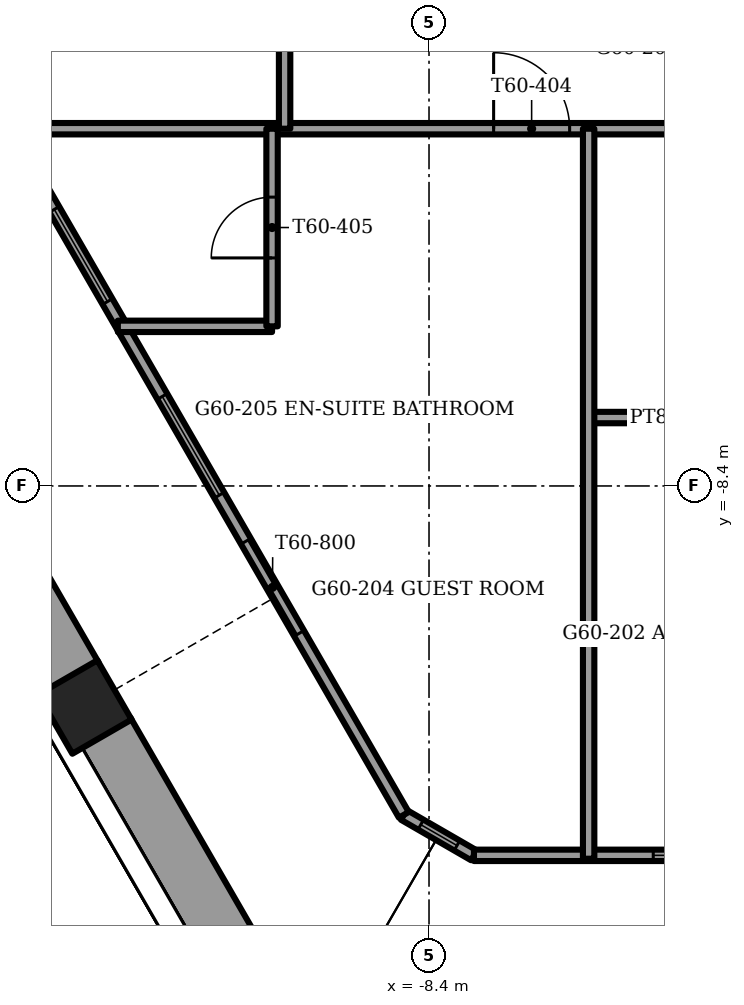
"""IFC4 building model, lengths in metres.
Left out: names, types, materials, properties, quantities, classifications, styles, units other than length and angle.
Written with IfcOpenShell. Run it as: python <this file> out.ifc"""

import sys

from ifc_helpers import new_model, si_unit, direction, frame, frame_2d, origin, origin_2d, place, context, subcontext, project, spatial, rectangle, extrude, element, fill, save


model = new_model("IFC4")
c1 = context("Model", 3, precision=1e-05, world=origin(), true_north=direction((0.0, 1.0)))
c2 = subcontext(c1, "Body", "Model", "MODEL_VIEW")
j1 = project(units=[si_unit("LENGTHUNIT", "METRE"), si_unit("PLANEANGLEUNIT", "RADIAN")], contexts=[c1])
p1 = place(None, origin())
s1 = spatial("IfcSite", under=j1, at=p1, CompositionType="ELEMENT")
p2 = place(p1, origin())
s2 = spatial("IfcBuilding", under=s1, at=p2, CompositionType="ELEMENT")
p3 = place(p2, frame((0.0, 0.0, 245.0)))
s3 = spatial("IfcBuildingStorey", under=s2, at=p3, CompositionType="ELEMENT", Elevation=245.0)
p4 = place(p3, frame((-12.928, -11.308, -1.2), z_axis=(0.0, 0.0, 1.0), x_axis=(-0.5, 0.866025403784, 0.0)))
e1 = element("IfcColumn", 1, at=p4, inside=s3, PredefinedType="COLUMN", context=c2, shape_type="SweptSolid", body=[
    extrude(rectangle(XDim=0.9, YDim=0.9, at=origin_2d()), origin(), (0.0, 0.0, 1.0), 3.75),
])
p5 = place(p3, frame((-16.047, -5.906, 0.0), z_axis=(0.0, 0.0, 1.0), x_axis=(0.500015433515, -0.866016493057, 0.0)))
e2 = element("IfcWall", 2, at=p5, inside=s3, PredefinedType="PARAPET", context=c2, shape_type="SweptSolid", body=[
    extrude(rectangle(XDim=5.819, YDim=0.9, at=frame_2d((2.909, 0.0))), origin(), (0.0, 0.0, 1.0), 1.1),
])
p6 = place(p3, frame((-12.718, -11.672, 0.0), z_axis=(0.0, 0.0, 1.0), x_axis=(0.500002852929, -0.866023756639, 0.0)))
e3 = element("IfcWall", 3, at=p6, inside=s3, PredefinedType="PARAPET", context=c2, shape_type="SweptSolid", body=[
    extrude(rectangle(XDim=4.723, YDim=0.9, at=frame_2d((2.362, 0.0))), origin(), (0.0, 0.0, 1.0), 1.1),
])
p7 = place(p3, frame((-15.387, -1.198, 0.0), z_axis=(0.0, 0.0, 1.0), x_axis=(0.499997087355, -0.866027085394, 0.0)))
e4 = element("IfcWall", 4, at=p7, inside=s3, PredefinedType="SOLIDWALL", context=c2, shape_type="SweptSolid", body=[
    extrude(rectangle(XDim=13.312, YDim=0.15, at=frame_2d((6.656, 0.0))), origin(), (0.0, 0.0, 1.0), 3.45),
])
p8 = place(p7, frame((4.115, 0.0, 0.15)))
e5 = element("IfcOpeningElement", 5, at=p8, cuts=e4, PredefinedType="OPENING", context=c2, shape_type="SweptSolid", body=[
    extrude(rectangle(XDim=1.4, YDim=2.85, at=frame_2d((0.7, 1.425))), frame((0.0, 0.075, 0.0), z_axis=(0.0, -1.0, 0.0), x_axis=(1.0, 0.0, 0.0)), (0.0, 0.0, 1.0), 0.15),
])
p9 = place(p7, frame((6.956, 0.0, 0.15)))
e6 = element("IfcOpeningElement", 6, at=p9, cuts=e4, PredefinedType="OPENING", context=c2, shape_type="SweptSolid", body=[
    extrude(rectangle(XDim=1.5, YDim=2.85, at=frame_2d((0.75, 1.425))), frame((0.0, 0.075, 0.0), z_axis=(0.0, -1.0, 0.0), x_axis=(1.0, 0.0, 0.0)), (0.0, 0.0, 1.0), 0.15),
])
p10 = place(p7, frame((9.156, 0.0, 0.0)))
e7 = element("IfcOpeningElement", 7, at=p10, cuts=e4, PredefinedType="OPENING", context=c2, shape_type="SweptSolid", body=[
    extrude(rectangle(XDim=1.4, YDim=2.4, at=frame_2d((0.7, 1.2))), frame((0.0, 0.075, 0.0), z_axis=(0.0, -1.0, 0.0), x_axis=(1.0, 0.0, 0.0)), (0.0, 0.0, 1.0), 0.15),
])
p11 = place(p7, frame((0.428, 0.0, 0.15)))
e8 = element("IfcOpeningElement", 8, at=p11, cuts=e4, PredefinedType="OPENING", context=c2, shape_type="SweptSolid", body=[
    extrude(rectangle(XDim=1.5, YDim=2.73, at=frame_2d((0.75, 1.365))), frame((0.0, 0.075, 0.0), z_axis=(0.0, -1.0, 0.0), x_axis=(1.0, 0.0, 0.0)), (0.0, 0.0, 1.0), 0.15),
])
p12 = place(p3, frame((-7.809, -13.26, 0.0), z_axis=(0.0, 0.0, 1.0), x_axis=(1.0, 0.0, 0.0)))
e9 = element("IfcWall", 9, at=p12, inside=s3, PredefinedType="SOLIDWALL", context=c2, shape_type="SweptSolid", body=[
    extrude(rectangle(XDim=15.618, YDim=0.15, at=frame_2d((7.809, 0.0))), origin(), (0.0, 0.0, 1.0), 3.45),
])
p13 = place(p12, frame((2.359, 0.0, 0.15)))
e10 = element("IfcOpeningElement", 10, at=p13, cuts=e9, PredefinedType="OPENING", context=c2, shape_type="SweptSolid", body=[
    extrude(rectangle(XDim=0.9, YDim=2.85, at=frame_2d((0.45, 1.425))), frame((0.0, 0.075, 0.0), z_axis=(0.0, -1.0, 0.0), x_axis=(1.0, 0.0, 0.0)), (0.0, 0.0, 1.0), 0.15),
])
p14 = place(p12, frame((3.409, 0.0, 0.0)))
e11 = element("IfcOpeningElement", 11, at=p14, cuts=e9, PredefinedType="OPENING", context=c2, shape_type="SweptSolid", body=[
    extrude(rectangle(XDim=1.4, YDim=2.4, at=frame_2d((0.7, 1.2))), frame((0.0, 0.075, 0.0), z_axis=(0.0, -1.0, 0.0), x_axis=(1.0, 0.0, 0.0)), (0.0, 0.0, 1.0), 0.15),
])
p15 = place(p12, frame((6.059, 0.0, 0.15)))
e12 = element("IfcOpeningElement", 12, at=p15, cuts=e9, PredefinedType="OPENING", context=c2, shape_type="SweptSolid", body=[
    extrude(rectangle(XDim=1.5, YDim=2.85, at=frame_2d((0.75, 1.425))), frame((0.0, 0.075, 0.0), z_axis=(0.0, -1.0, 0.0), x_axis=(1.0, 0.0, 0.0)), (0.0, 0.0, 1.0), 0.15),
])
p16 = place(p12, frame((7.609, 0.0, 0.0)))
e13 = element("IfcOpeningElement", 13, at=p16, cuts=e9, PredefinedType="OPENING", context=c2, shape_type="SweptSolid", body=[
    extrude(rectangle(XDim=1.4, YDim=2.4, at=frame_2d((0.7, 1.2))), frame((0.0, 0.075, 0.0), z_axis=(0.0, -1.0, 0.0), x_axis=(1.0, 0.0, 0.0)), (0.0, 0.0, 1.0), 0.15),
])
p17 = place(p12, frame((10.259, 0.0, 0.15)))
e14 = element("IfcOpeningElement", 14, at=p17, cuts=e9, PredefinedType="OPENING", context=c2, shape_type="SweptSolid", body=[
    extrude(rectangle(XDim=1.5, YDim=2.85, at=frame_2d((0.75, 1.425))), frame((0.0, 0.075, 0.0), z_axis=(0.0, -1.0, 0.0), x_axis=(1.0, 0.0, 0.0)), (0.0, 0.0, 1.0), 0.15),
])
p18 = place(p12, frame((11.859, 0.0, 0.15)))
e15 = element("IfcOpeningElement", 15, at=p18, cuts=e9, PredefinedType="OPENING", context=c2, shape_type="SweptSolid", body=[
    extrude(rectangle(XDim=1.4, YDim=2.85, at=frame_2d((0.7, 1.425))), frame((0.0, 0.075, 0.0), z_axis=(0.0, -1.0, 0.0), x_axis=(1.0, 0.0, 0.0)), (0.0, 0.0, 1.0), 0.15),
])
p19 = place(p3, frame((-8.731, -12.727, 0.0), z_axis=(0.0, 0.0, 1.0), x_axis=(0.865990848561, -0.500059846627, 0.0)))
e16 = element("IfcWall", 16, at=p19, inside=s3, PredefinedType="SOLIDWALL", context=c2, shape_type="SweptSolid", body=[
    extrude(rectangle(XDim=1.065, YDim=0.15, at=frame_2d((0.532, 0.0))), origin(), (0.0, 0.0, 1.0), 3.45),
])
p20 = place(p19, frame((0.258, 0.0, 0.15)))
e17 = element("IfcOpeningElement", 17, at=p20, cuts=e16, PredefinedType="OPENING", context=c2, shape_type="SweptSolid", body=[
    extrude(rectangle(XDim=0.55, YDim=2.85, at=frame_2d((0.275, 1.425))), frame((0.0, 0.075, 0.0), z_axis=(0.0, -1.0, 0.0), x_axis=(1.0, 0.0, 0.0)), (0.0, 0.0, 1.0), 0.15),
])
p21 = place(p3, frame((-6.3, -7.5, 0.0), z_axis=(0.0, 0.0, 1.0), x_axis=(1.0, 0.0, 0.0)))
e18 = element("IfcWall", 18, at=p21, inside=s3, PredefinedType="PARTITIONING", context=c2, shape_type="SweptSolid", body=[
    extrude(rectangle(XDim=2.8, YDim=0.15, at=frame_2d((1.4, 0.0))), origin(), (0.0, 0.0, 1.0), 3.45),
])
p22 = place(p3, frame((-12.494, -6.3, 0.0), z_axis=(0.0, 0.0, 1.0), x_axis=(1.0, 0.0, 0.0)))
e19 = element("IfcWall", 19, at=p22, inside=s3, PredefinedType="PARTITIONING", context=c2, shape_type="SweptSolid", body=[
    extrude(rectangle(XDim=2.029, YDim=0.15, at=frame_2d((1.014, 0.0))), origin(), (0.0, 0.0, 1.0), 3.45),
])
p23 = place(p3, frame((-13.995, -3.7, 0.0), z_axis=(0.0, 0.0, 1.0), x_axis=(1.0, 0.0, 0.0)))
e20 = element("IfcWall", 20, at=p23, inside=s3, PredefinedType="PARTITIONING", context=c2, shape_type="SweptSolid", body=[
    extrude(rectangle(XDim=19.785, YDim=0.15, at=frame_2d((9.893, 0.0))), origin(), (0.0, 0.0, 1.0), 3.45),
])
p24 = place(p23, frame((14.845, 0.0, 0.0)))
e21 = element("IfcOpeningElement", 21, at=p24, cuts=e20, PredefinedType="OPENING", context=c2, shape_type="SweptSolid", body=[
    extrude(rectangle(XDim=1.0, YDim=2.1, at=frame_2d((0.5, 1.05))), frame((0.0, 0.075, 0.0), z_axis=(0.0, -1.0, 0.0), x_axis=(1.0, 0.0, 0.0)), (0.0, 0.0, 1.0), 0.15),
])
p25 = place(p23, frame((10.645, 0.0, 0.0)))
e22 = element("IfcOpeningElement", 22, at=p25, cuts=e20, PredefinedType="OPENING", context=c2, shape_type="SweptSolid", body=[
    extrude(rectangle(XDim=1.0, YDim=2.1, at=frame_2d((0.5, 1.05))), frame((0.0, 0.075, 0.0), z_axis=(0.0, -1.0, 0.0), x_axis=(1.0, 0.0, 0.0)), (0.0, 0.0, 1.0), 0.15),
])
p26 = place(p23, frame((6.445, 0.0, 0.0)))
e23 = element("IfcOpeningElement", 23, at=p26, cuts=e20, PredefinedType="OPENING", context=c2, shape_type="SweptSolid", body=[
    extrude(rectangle(XDim=1.0, YDim=2.1, at=frame_2d((0.5, 1.05))), frame((0.0, 0.075, 0.0), z_axis=(0.0, -1.0, 0.0), x_axis=(1.0, 0.0, 0.0)), (0.0, 0.0, 1.0), 0.15),
])
p27 = place(p23, frame((17.445, 0.0, 0.0)))
e24 = element("IfcOpeningElement", 24, at=p27, cuts=e20, PredefinedType="OPENING", context=c2, shape_type="SweptSolid", body=[
    extrude(rectangle(XDim=1.0, YDim=2.1, at=frame_2d((0.5, 1.05))), frame((0.0, 0.075, 0.0), z_axis=(0.0, -1.0, 0.0), x_axis=(1.0, 0.0, 0.0)), (0.0, 0.0, 1.0), 0.15),
])
p28 = place(p3, frame((-6.3, -13.304, 0.0), z_axis=(0.0, 0.0, 1.0), x_axis=(0.0, 1.0, 0.0)))
e25 = element("IfcWall", 25, at=p28, inside=s3, PredefinedType="PARTITIONING", context=c2, shape_type="SweptSolid", body=[
    extrude(rectangle(XDim=9.604, YDim=0.15, at=frame_2d((4.802, 0.0))), origin(), (0.0, 0.0, 1.0), 3.45),
])
p29 = place(p3, frame((-10.3, -3.7, 0.0), z_axis=(0.0, 0.0, 1.0), x_axis=(0.0, 1.0, 0.0)))
e26 = element("IfcWall", 26, at=p29, inside=s3, PredefinedType="PARTITIONING", context=c2, shape_type="SweptSolid", body=[
    extrude(rectangle(XDim=12.469, YDim=0.15, at=frame_2d((6.234, 0.0))), origin(), (0.0, 0.0, 1.0), 3.45),
])
p30 = place(p29, frame((4.332, 0.0, 0.0)))
e27 = element("IfcOpeningElement", 27, at=p30, cuts=e26, PredefinedType="OPENING", context=c2, shape_type="SweptSolid", body=[
    extrude(rectangle(XDim=1.0, YDim=2.1, at=frame_2d((0.5, 1.05))), frame((0.0, 0.075, 0.0), z_axis=(0.0, -1.0, 0.0), x_axis=(1.0, 0.0, 0.0)), (0.0, 0.0, 1.0), 0.15),
])
p31 = place(p29, frame((9.815, 0.0, 0.0)))
e28 = element("IfcOpeningElement", 28, at=p31, cuts=e26, PredefinedType="OPENING", context=c2, shape_type="SweptSolid", body=[
    extrude(rectangle(XDim=1.0, YDim=2.1, at=frame_2d((0.5, 1.05))), frame((0.0, 0.075, 0.0), z_axis=(0.0, -1.0, 0.0), x_axis=(1.0, 0.0, 0.0)), (0.0, 0.0, 1.0), 0.15),
])
p32 = place(p3, frame((-10.465, -6.3, 0.0), z_axis=(0.0, 0.0, 1.0), x_axis=(0.0, 1.0, 0.0)))
e29 = element("IfcWall", 29, at=p32, inside=s3, PredefinedType="PARTITIONING", context=c2, shape_type="SweptSolid", body=[
    extrude(rectangle(XDim=2.6, YDim=0.15, at=frame_2d((1.3, 0.0))), origin(), (0.0, 0.0, 1.0), 3.45),
])
p33 = place(p32, frame((0.9, 0.0, 0.0)))
e30 = element("IfcOpeningElement", 30, at=p33, cuts=e29, PredefinedType="OPENING", context=c2, shape_type="SweptSolid", body=[
    extrude(rectangle(XDim=0.8, YDim=2.1, at=frame_2d((0.4, 1.05))), frame((0.0, 0.075, 0.0), z_axis=(0.0, -1.0, 0.0), x_axis=(1.0, 0.0, 0.0)), (0.0, 0.0, 1.0), 0.15),
])
p34 = place(p8, origin())
e31 = element("IfcWindow", 31, at=p34, inside=s3, PartitioningType="SINGLE_PANEL", PredefinedType="WINDOW", context=c2, shape_type="SweptSolid", body=[
    extrude(rectangle(XDim=1.4, YDim=2.85, at=frame_2d((0.7, 1.425))), frame((0.0, 0.03, 0.0), z_axis=(0.0, -1.0, 0.0), x_axis=(1.0, 0.0, 0.0)), (0.0, 0.0, 1.0), 0.06),
])
fill(e5, e31)
p35 = place(p9, origin())
e32 = element("IfcWindow", 32, at=p35, inside=s3, PartitioningType="SINGLE_PANEL", PredefinedType="WINDOW", context=c2, shape_type="SweptSolid", body=[
    extrude(rectangle(XDim=1.5, YDim=2.85, at=frame_2d((0.75, 1.425))), frame((0.0, 0.03, 0.0), z_axis=(0.0, -1.0, 0.0), x_axis=(1.0, 0.0, 0.0)), (0.0, 0.0, 1.0), 0.06),
])
fill(e6, e32)
p36 = place(p10, origin())
e33 = element("IfcDoor", 33, at=p36, inside=s3, OperationType="SLIDING_TO_RIGHT", PredefinedType="DOOR", context=c2, shape_type="SweptSolid", body=[
    extrude(rectangle(XDim=1.4, YDim=2.4, at=frame_2d((0.7, 1.2))), frame((0.0, 0.025, 0.0), z_axis=(0.0, -1.0, 0.0), x_axis=(1.0, 0.0, 0.0)), (0.0, 0.0, 1.0), 0.05),
])
fill(e7, e33)
p37 = place(p13, origin())
e34 = element("IfcWindow", 34, at=p37, inside=s3, PartitioningType="SINGLE_PANEL", PredefinedType="WINDOW", context=c2, shape_type="SweptSolid", body=[
    extrude(rectangle(XDim=0.9, YDim=2.85, at=frame_2d((0.45, 1.425))), frame((0.0, 0.03, 0.0), z_axis=(0.0, -1.0, 0.0), x_axis=(1.0, 0.0, 0.0)), (0.0, 0.0, 1.0), 0.06),
])
fill(e10, e34)
p38 = place(p20, origin())
e35 = element("IfcWindow", 35, at=p38, inside=s3, PartitioningType="SINGLE_PANEL", PredefinedType="WINDOW", context=c2, shape_type="SweptSolid", body=[
    extrude(rectangle(XDim=0.55, YDim=2.85, at=frame_2d((0.275, 1.425))), frame((0.0, 0.03, 0.0), z_axis=(0.0, -1.0, 0.0), x_axis=(1.0, 0.0, 0.0)), (0.0, 0.0, 1.0), 0.06),
])
fill(e17, e35)
p39 = place(p26, origin())
e36 = element("IfcDoor", 36, at=p39, inside=s3, OperationType="SINGLE_SWING_RIGHT", PredefinedType="DOOR", context=c2, shape_type="SweptSolid", body=[
    extrude(rectangle(XDim=1.0, YDim=2.1, at=frame_2d((0.5, 1.05))), frame((0.0, 0.025, 0.0), z_axis=(0.0, -1.0, 0.0), x_axis=(1.0, 0.0, 0.0)), (0.0, 0.0, 1.0), 0.05),
])
fill(e23, e36)
p40 = place(p33, origin())
e37 = element("IfcDoor", 37, at=p40, inside=s3, OperationType="SINGLE_SWING_RIGHT", PredefinedType="DOOR", context=c2, shape_type="SweptSolid", body=[
    extrude(rectangle(XDim=0.8, YDim=2.1, at=frame_2d((0.4, 1.05))), frame((0.0, 0.025, 0.0), z_axis=(0.0, -1.0, 0.0), x_axis=(1.0, 0.0, 0.0)), (0.0, 0.0, 1.0), 0.05),
])
fill(e30, e37)
save(model, sys.argv[1])
